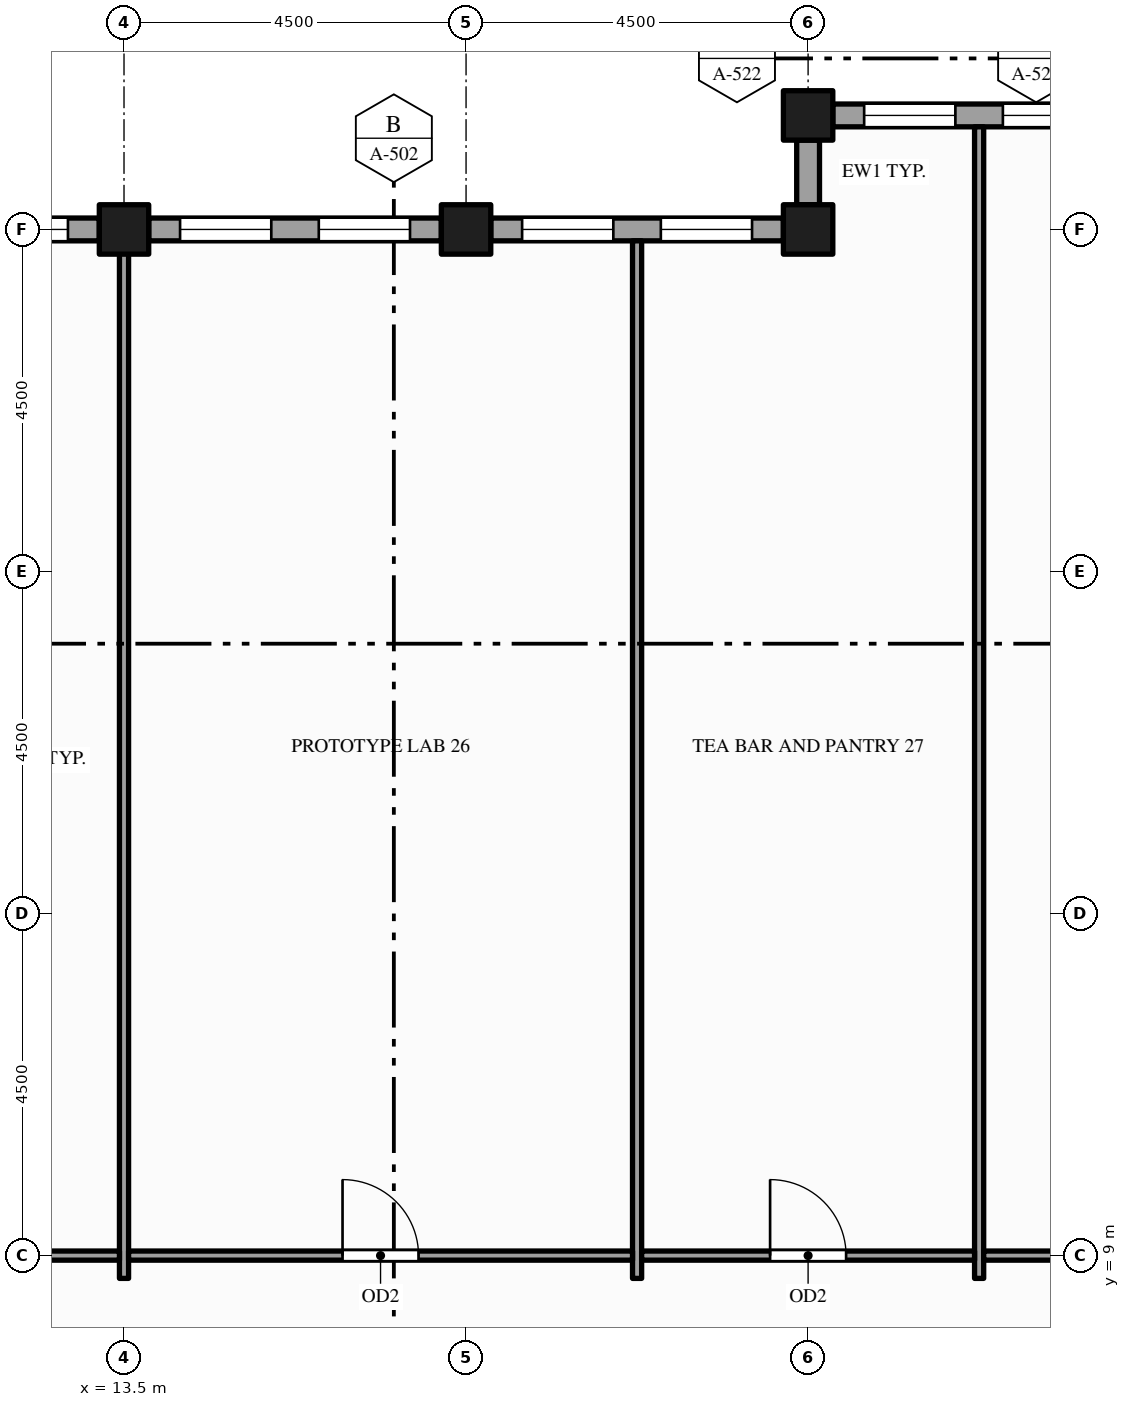
"""IFC4 building model, lengths in metres.
Left out: names, types, materials, properties, quantities, classifications, styles, units other than length and angle.
Written with IfcOpenShell. Run it as: python <this file> out.ifc"""

import sys

from ifc_helpers import new_model, si_unit, direction, frame, frame_2d, origin, origin_2d, place, context, subcontext, project, spatial, rectangle, hollow_rectangle, extrude, element, fill, save


model = new_model("IFC4")
c1 = context("Model", 3, precision=1e-05, world=origin(), true_north=direction((0.0, 1.0)))
c2 = subcontext(c1, "Body", "Model", "MODEL_VIEW")
j1 = project(units=[si_unit("LENGTHUNIT", "METRE"), si_unit("PLANEANGLEUNIT", "RADIAN")], contexts=[c1])
p1 = place(None, origin())
s1 = spatial("IfcSite", under=j1, at=p1, CompositionType="ELEMENT")
p2 = place(p1, origin())
s2 = spatial("IfcBuilding", under=s1, at=p2, CompositionType="ELEMENT")
p3 = place(p2, frame((0.0, 0.0, 273.0)))
s3 = spatial("IfcBuildingStorey", under=s2, at=p3, CompositionType="ELEMENT", Elevation=273.0)
for number, where, z_axis, x_axis in (
    (1, (13.5, 22.5, -0.15), (0.0, 0.0, 1.0), (1.0, 0.0, 0.0)),
    (2, (18.0, 22.5, -0.15), (0.0, 0.0, 1.0), (1.0, 0.0, 0.0)),
    (3, (22.5, 22.5, -0.15), (0.0, 0.0, 1.0), (1.0, 0.0, 0.0)),
    (4, (22.5, 24.0, -0.15), (0.0, 0.0, 1.0), (1.0, 0.0, 0.0)),
):
    element("IfcColumn", number, at=place(p3, frame(where, z_axis=z_axis, x_axis=x_axis)), inside=s3, PredefinedType="COLUMN", context=c2, shape_type="SweptSolid", body=[
        extrude(hollow_rectangle(XDim=0.65, YDim=0.65, WallThickness=0.032, at=origin_2d()), origin(), (0.0, 0.0, 1.0), 4.0),
    ])
p4 = place(p3, frame((26.675, 24.0, 0.0), z_axis=(0.0, 0.0, 1.0), x_axis=(-1.0, 0.0, 0.0)))
e5 = element("IfcWall", 5, at=p4, inside=s3, PredefinedType="STANDARD", context=c2, shape_type="SweptSolid", body=[
    extrude(rectangle(XDim=3.85, YDim=0.3, at=frame_2d((1.925, 0.0))), origin(), (0.0, 0.0, 1.0), 2.87),
])
p5 = place(p4, frame((0.413, 0.0, 0.9)))
e6 = element("IfcOpeningElement", 6, at=p5, cuts=e5, PredefinedType="OPENING", context=c2, shape_type="SweptSolid", body=[
    extrude(rectangle(XDim=1.2, YDim=1.75, at=frame_2d((0.6, 0.875))), frame((0.0, 0.16, 0.0), z_axis=(0.0, -1.0, 0.0), x_axis=(1.0, 0.0, 0.0)), (0.0, 0.0, 1.0), 0.32),
])
p6 = place(p4, frame((2.238, 0.0, 0.9)))
e7 = element("IfcOpeningElement", 7, at=p6, cuts=e5, PredefinedType="OPENING", context=c2, shape_type="SweptSolid", body=[
    extrude(rectangle(XDim=1.2, YDim=1.75, at=frame_2d((0.6, 0.875))), frame((0.0, 0.16, 0.0), z_axis=(0.0, -1.0, 0.0), x_axis=(1.0, 0.0, 0.0)), (0.0, 0.0, 1.0), 0.32),
])
p7 = place(p3, frame((22.5, 23.675, 0.0), z_axis=(0.0, 0.0, 1.0), x_axis=(0.0, -1.0, 0.0)))
e8 = element("IfcWall", 8, at=p7, inside=s3, PredefinedType="STANDARD", context=c2, shape_type="SweptSolid", body=[
    extrude(rectangle(XDim=0.85, YDim=0.3, at=frame_2d((0.425, 0.0))), origin(), (0.0, 0.0, 1.0), 3.162),
])
p8 = place(p3, frame((22.175, 22.5, 0.0), z_axis=(0.0, 0.0, 1.0), x_axis=(-1.0, 0.0, 0.0)))
e9 = element("IfcWall", 9, at=p8, inside=s3, PredefinedType="STANDARD", context=c2, shape_type="SweptSolid", body=[
    extrude(rectangle(XDim=3.85, YDim=0.3, at=frame_2d((1.925, 0.0))), origin(), (0.0, 0.0, 1.0), 2.87),
])
p9 = place(p8, frame((0.413, 0.0, 0.9)))
e10 = element("IfcOpeningElement", 10, at=p9, cuts=e9, PredefinedType="OPENING", context=c2, shape_type="SweptSolid", body=[
    extrude(rectangle(XDim=1.2, YDim=1.75, at=frame_2d((0.6, 0.875))), frame((0.0, 0.16, 0.0), z_axis=(0.0, -1.0, 0.0), x_axis=(1.0, 0.0, 0.0)), (0.0, 0.0, 1.0), 0.32),
])
p10 = place(p8, frame((2.238, 0.0, 0.9)))
e11 = element("IfcOpeningElement", 11, at=p10, cuts=e9, PredefinedType="OPENING", context=c2, shape_type="SweptSolid", body=[
    extrude(rectangle(XDim=1.2, YDim=1.75, at=frame_2d((0.6, 0.875))), frame((0.0, 0.16, 0.0), z_axis=(0.0, -1.0, 0.0), x_axis=(1.0, 0.0, 0.0)), (0.0, 0.0, 1.0), 0.32),
])
p11 = place(p3, frame((17.675, 22.5, 0.0), z_axis=(0.0, 0.0, 1.0), x_axis=(-1.0, 0.0, 0.0)))
e12 = element("IfcWall", 12, at=p11, inside=s3, PredefinedType="STANDARD", context=c2, shape_type="SweptSolid", body=[
    extrude(rectangle(XDim=3.85, YDim=0.3, at=frame_2d((1.925, 0.0))), origin(), (0.0, 0.0, 1.0), 2.87),
])
p12 = place(p11, frame((0.413, 0.0, 0.9)))
e13 = element("IfcOpeningElement", 13, at=p12, cuts=e12, PredefinedType="OPENING", context=c2, shape_type="SweptSolid", body=[
    extrude(rectangle(XDim=1.2, YDim=1.75, at=frame_2d((0.6, 0.875))), frame((0.0, 0.16, 0.0), z_axis=(0.0, -1.0, 0.0), x_axis=(1.0, 0.0, 0.0)), (0.0, 0.0, 1.0), 0.32),
])
p13 = place(p11, frame((2.238, 0.0, 0.9)))
e14 = element("IfcOpeningElement", 14, at=p13, cuts=e12, PredefinedType="OPENING", context=c2, shape_type="SweptSolid", body=[
    extrude(rectangle(XDim=1.2, YDim=1.75, at=frame_2d((0.6, 0.875))), frame((0.0, 0.16, 0.0), z_axis=(0.0, -1.0, 0.0), x_axis=(1.0, 0.0, 0.0)), (0.0, 0.0, 1.0), 0.32),
])
p14 = place(p3, frame((13.175, 22.5, 0.0), z_axis=(0.0, 0.0, 1.0), x_axis=(-1.0, 0.0, 0.0)))
e15 = element("IfcWall", 15, at=p14, inside=s3, PredefinedType="STANDARD", context=c2, shape_type="SweptSolid", body=[
    extrude(rectangle(XDim=3.85, YDim=0.3, at=frame_2d((1.925, 0.0))), origin(), (0.0, 0.0, 1.0), 2.87),
])
p15 = place(p14, frame((0.413, 0.0, 0.9)))
e16 = element("IfcOpeningElement", 16, at=p15, cuts=e15, PredefinedType="OPENING", context=c2, shape_type="SweptSolid", body=[
    extrude(rectangle(XDim=1.2, YDim=1.75, at=frame_2d((0.6, 0.875))), frame((0.0, 0.16, 0.0), z_axis=(0.0, -1.0, 0.0), x_axis=(1.0, 0.0, 0.0)), (0.0, 0.0, 1.0), 0.32),
])
p16 = place(p14, frame((2.238, 0.0, 0.9)))
e17 = element("IfcOpeningElement", 17, at=p16, cuts=e15, PredefinedType="OPENING", context=c2, shape_type="SweptSolid", body=[
    extrude(rectangle(XDim=1.2, YDim=1.75, at=frame_2d((0.6, 0.875))), frame((0.0, 0.16, 0.0), z_axis=(0.0, -1.0, 0.0), x_axis=(1.0, 0.0, 0.0)), (0.0, 0.0, 1.0), 0.32),
])
for number, where, z_axis, x_axis in (
    (18, (13.5, 8.7, 0.0), (0.0, 0.0, 1.0), (0.0, 1.0, 0.0)),
    (19, (20.25, 8.7, 0.0), (0.0, 0.0, 1.0), (0.0, 1.0, 0.0)),
):
    element("IfcWall", number, at=place(p3, frame(where, z_axis=z_axis, x_axis=x_axis)), inside=s3, PredefinedType="PARTITIONING", context=c2, shape_type="SweptSolid", body=[
        extrude(rectangle(XDim=13.65, YDim=0.12, at=frame_2d((6.825, 0.0))), origin(), (0.0, 0.0, 1.0), 2.87),
    ])
p17 = place(p3, frame((24.75, 8.7, 0.0), z_axis=(0.0, 0.0, 1.0), x_axis=(0.0, 1.0, 0.0)))
e20 = element("IfcWall", 20, at=p17, inside=s3, PredefinedType="PARTITIONING", context=c2, shape_type="SweptSolid", body=[
    extrude(rectangle(XDim=15.15, YDim=0.12, at=frame_2d((7.575, 0.0))), origin(), (0.0, 0.0, 1.0), 2.87),
])
p18 = place(p3, frame((0.15, 9.0, 0.0), z_axis=(0.0, 0.0, 1.0), x_axis=(1.0, 0.0, 0.0)))
e21 = element("IfcWall", 21, at=p18, inside=s3, PredefinedType="PARTITIONING", context=c2, shape_type="SweptSolid", body=[
    extrude(rectangle(XDim=13.29, YDim=0.12, at=frame_2d((6.645, 0.0))), origin(), (0.0, 0.0, 1.0), 2.87),
])
p19 = place(p18, frame((5.755, 0.0, 0.0)))
e22 = element("IfcOpeningElement", 22, at=p19, cuts=e21, PredefinedType="OPENING", context=c2, shape_type="SweptSolid", body=[
    extrude(rectangle(XDim=1.8, YDim=2.1, at=frame_2d((0.9, 1.05))), frame((0.0, 0.07, 0.0), z_axis=(0.0, -1.0, 0.0), x_axis=(1.0, 0.0, 0.0)), (0.0, 0.0, 1.0), 0.14),
])
p20 = place(p3, frame((13.56, 9.0, 0.0), z_axis=(0.0, 0.0, 1.0), x_axis=(1.0, 0.0, 0.0)))
e23 = element("IfcWall", 23, at=p20, inside=s3, PredefinedType="PARTITIONING", context=c2, shape_type="SweptSolid", body=[
    extrude(rectangle(XDim=6.63, YDim=0.12, at=frame_2d((3.315, 0.0))), origin(), (0.0, 0.0, 1.0), 2.87),
])
p21 = place(p20, frame((2.815, 0.0, 0.0)))
e24 = element("IfcOpeningElement", 24, at=p21, cuts=e23, PredefinedType="OPENING", context=c2, shape_type="SweptSolid", body=[
    extrude(rectangle(XDim=1.0, YDim=2.1, at=frame_2d((0.5, 1.05))), frame((0.0, 0.07, 0.0), z_axis=(0.0, -1.0, 0.0), x_axis=(1.0, 0.0, 0.0)), (0.0, 0.0, 1.0), 0.14),
])
p22 = place(p3, frame((20.31, 9.0, 0.0), z_axis=(0.0, 0.0, 1.0), x_axis=(1.0, 0.0, 0.0)))
e25 = element("IfcWall", 25, at=p22, inside=s3, PredefinedType="PARTITIONING", context=c2, shape_type="SweptSolid", body=[
    extrude(rectangle(XDim=4.38, YDim=0.12, at=frame_2d((2.19, 0.0))), origin(), (0.0, 0.0, 1.0), 2.87),
])
p23 = place(p22, frame((1.69, 0.0, 0.0)))
e26 = element("IfcOpeningElement", 26, at=p23, cuts=e25, PredefinedType="OPENING", context=c2, shape_type="SweptSolid", body=[
    extrude(rectangle(XDim=1.0, YDim=2.1, at=frame_2d((0.5, 1.05))), frame((0.0, 0.07, 0.0), z_axis=(0.0, -1.0, 0.0), x_axis=(1.0, 0.0, 0.0)), (0.0, 0.0, 1.0), 0.14),
])
p24 = place(p3, frame((24.81, 9.0, 0.0), z_axis=(0.0, 0.0, 1.0), x_axis=(1.0, 0.0, 0.0)))
e27 = element("IfcWall", 27, at=p24, inside=s3, PredefinedType="PARTITIONING", context=c2, shape_type="SweptSolid", body=[
    extrude(rectangle(XDim=13.38, YDim=0.12, at=frame_2d((6.69, 0.0))), origin(), (0.0, 0.0, 1.0), 2.87),
])
p25 = place(p24, frame((5.79, 0.0, 0.0)))
e28 = element("IfcOpeningElement", 28, at=p25, cuts=e27, PredefinedType="OPENING", context=c2, shape_type="SweptSolid", body=[
    extrude(rectangle(XDim=1.8, YDim=2.1, at=frame_2d((0.9, 1.05))), frame((0.0, 0.07, 0.0), z_axis=(0.0, -1.0, 0.0), x_axis=(1.0, 0.0, 0.0)), (0.0, 0.0, 1.0), 0.14),
])
p26 = place(p5, origin())
e29 = element("IfcWindow", 29, at=p26, inside=s3, PartitioningType="SINGLE_PANEL", PredefinedType="WINDOW", context=c2, shape_type="SweptSolid", body=[
    extrude(rectangle(XDim=1.2, YDim=1.75, at=frame_2d((0.6, 0.875))), frame((0.0, 0.03, 0.0), z_axis=(0.0, -1.0, 0.0), x_axis=(1.0, 0.0, 0.0)), (0.0, 0.0, 1.0), 0.06),
])
fill(e6, e29)
p27 = place(p6, origin())
e30 = element("IfcWindow", 30, at=p27, inside=s3, PartitioningType="SINGLE_PANEL", PredefinedType="WINDOW", context=c2, shape_type="SweptSolid", body=[
    extrude(rectangle(XDim=1.2, YDim=1.75, at=frame_2d((0.6, 0.875))), frame((0.0, 0.03, 0.0), z_axis=(0.0, -1.0, 0.0), x_axis=(1.0, 0.0, 0.0)), (0.0, 0.0, 1.0), 0.06),
])
fill(e7, e30)
p28 = place(p9, origin())
e31 = element("IfcWindow", 31, at=p28, inside=s3, PartitioningType="SINGLE_PANEL", PredefinedType="WINDOW", context=c2, shape_type="SweptSolid", body=[
    extrude(rectangle(XDim=1.2, YDim=1.75, at=frame_2d((0.6, 0.875))), frame((0.0, 0.03, 0.0), z_axis=(0.0, -1.0, 0.0), x_axis=(1.0, 0.0, 0.0)), (0.0, 0.0, 1.0), 0.06),
])
fill(e10, e31)
p29 = place(p10, origin())
e32 = element("IfcWindow", 32, at=p29, inside=s3, PartitioningType="SINGLE_PANEL", PredefinedType="WINDOW", context=c2, shape_type="SweptSolid", body=[
    extrude(rectangle(XDim=1.2, YDim=1.75, at=frame_2d((0.6, 0.875))), frame((0.0, 0.03, 0.0), z_axis=(0.0, -1.0, 0.0), x_axis=(1.0, 0.0, 0.0)), (0.0, 0.0, 1.0), 0.06),
])
fill(e11, e32)
p30 = place(p12, origin())
e33 = element("IfcWindow", 33, at=p30, inside=s3, PartitioningType="SINGLE_PANEL", PredefinedType="WINDOW", context=c2, shape_type="SweptSolid", body=[
    extrude(rectangle(XDim=1.2, YDim=1.75, at=frame_2d((0.6, 0.875))), frame((0.0, 0.03, 0.0), z_axis=(0.0, -1.0, 0.0), x_axis=(1.0, 0.0, 0.0)), (0.0, 0.0, 1.0), 0.06),
])
fill(e13, e33)
p31 = place(p13, origin())
e34 = element("IfcWindow", 34, at=p31, inside=s3, PartitioningType="SINGLE_PANEL", PredefinedType="WINDOW", context=c2, shape_type="SweptSolid", body=[
    extrude(rectangle(XDim=1.2, YDim=1.75, at=frame_2d((0.6, 0.875))), frame((0.0, 0.03, 0.0), z_axis=(0.0, -1.0, 0.0), x_axis=(1.0, 0.0, 0.0)), (0.0, 0.0, 1.0), 0.06),
])
fill(e14, e34)
p32 = place(p15, origin())
e35 = element("IfcWindow", 35, at=p32, inside=s3, PartitioningType="SINGLE_PANEL", PredefinedType="WINDOW", context=c2, shape_type="SweptSolid", body=[
    extrude(rectangle(XDim=1.2, YDim=1.75, at=frame_2d((0.6, 0.875))), frame((0.0, 0.03, 0.0), z_axis=(0.0, -1.0, 0.0), x_axis=(1.0, 0.0, 0.0)), (0.0, 0.0, 1.0), 0.06),
])
fill(e16, e35)
p33 = place(p21, origin())
e36 = element("IfcDoor", 36, at=p33, inside=s3, OperationType="SINGLE_SWING_LEFT", PredefinedType="DOOR", context=c2, shape_type="SweptSolid", body=[
    extrude(rectangle(XDim=1.0, YDim=2.1, at=frame_2d((0.5, 1.05))), frame((0.0, 0.025, 0.0), z_axis=(0.0, -1.0, 0.0), x_axis=(1.0, 0.0, 0.0)), (0.0, 0.0, 1.0), 0.05),
])
fill(e24, e36)
p34 = place(p23, origin())
e37 = element("IfcDoor", 37, at=p34, inside=s3, OperationType="SINGLE_SWING_LEFT", PredefinedType="DOOR", context=c2, shape_type="SweptSolid", body=[
    extrude(rectangle(XDim=1.0, YDim=2.1, at=frame_2d((0.5, 1.05))), frame((0.0, 0.025, 0.0), z_axis=(0.0, -1.0, 0.0), x_axis=(1.0, 0.0, 0.0)), (0.0, 0.0, 1.0), 0.05),
])
fill(e26, e37)
save(model, sys.argv[1])
